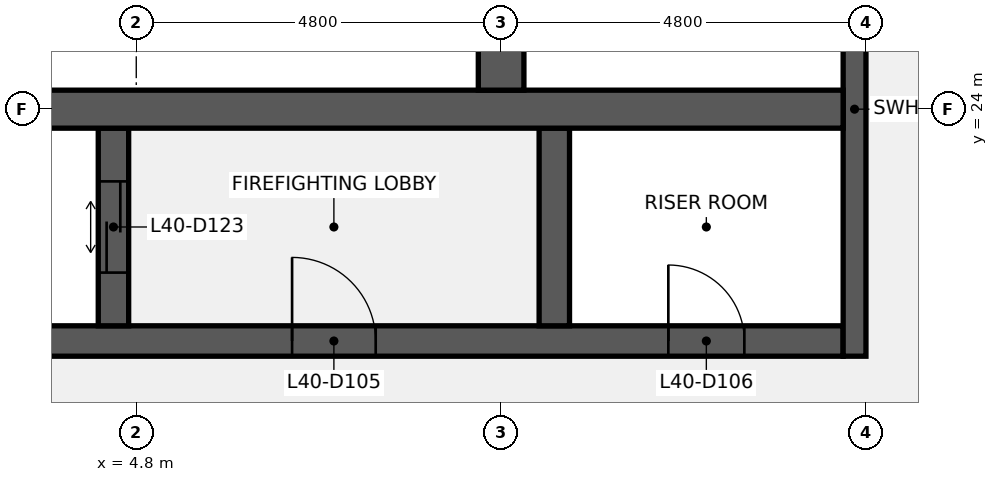
"""IFC4 building model, lengths in metres.
Left out: names, types, materials, properties, quantities, classifications, styles, units other than length and angle.
Written with IfcOpenShell. Run it as: python <this file> out.ifc"""

import sys

from ifc_helpers import new_model, si_unit, direction, frame, frame_2d, origin, place, context, subcontext, project, spatial, rectangle, extrude, element, fill, save


model = new_model("IFC4")
c1 = context("Model", 3, precision=1e-05, world=origin(), true_north=direction((0.0, 1.0)))
c2 = subcontext(c1, "Body", "Model", "MODEL_VIEW")
j1 = project(units=[si_unit("LENGTHUNIT", "METRE"), si_unit("PLANEANGLEUNIT", "RADIAN")], contexts=[c1])
p1 = place(None, origin())
s1 = spatial("IfcSite", under=j1, at=p1, CompositionType="ELEMENT")
p2 = place(p1, origin())
s2 = spatial("IfcBuilding", under=s1, at=p2, CompositionType="ELEMENT")
p3 = place(p2, frame((0.0, 0.0, 180.6)))
s3 = spatial("IfcBuildingStorey", under=s2, at=p3, CompositionType="ELEMENT", Elevation=180.6)
p4 = place(p3, frame((1.0, 20.95, 0.0), z_axis=(0.0, 0.0, 1.0), x_axis=(1.0, 0.0, 0.0)))
e1 = element("IfcWall", 1, at=p4, inside=s3, PredefinedType="SHEAR", context=c2, shape_type="SweptSolid", body=[
    extrude(rectangle(XDim=13.1, YDim=0.4, at=frame_2d((6.55, 0.0))), origin(), (0.0, 0.0, 1.0), 12.3),
])
p5 = place(p4, frame((5.85, 0.0, 0.0)))
e2 = element("IfcOpeningElement", 2, at=p5, cuts=e1, PredefinedType="OPENING", context=c2, shape_type="SweptSolid", body=[
    extrude(rectangle(XDim=1.1, YDim=2.1, at=frame_2d((0.55, 1.05))), frame((0.0, 0.21, 0.0), z_axis=(0.0, -1.0, 0.0), x_axis=(1.0, 0.0, 0.0)), (0.0, 0.0, 1.0), 0.42),
])
p6 = place(p4, frame((10.8, 0.0, 0.0)))
e3 = element("IfcOpeningElement", 3, at=p6, cuts=e1, PredefinedType="OPENING", context=c2, shape_type="SweptSolid", body=[
    extrude(rectangle(XDim=1.0, YDim=2.1, at=frame_2d((0.5, 1.05))), frame((0.0, 0.21, 0.0), z_axis=(0.0, -1.0, 0.0), x_axis=(1.0, 0.0, 0.0)), (0.0, 0.0, 1.0), 0.42),
])
p7 = place(p3, frame((14.25, 20.75, 0.0), z_axis=(0.0, 0.0, 1.0), x_axis=(0.0, 1.0, 0.0)))
e4 = element("IfcWall", 4, at=p7, inside=s3, PredefinedType="SHEAR", context=c2, shape_type="SweptSolid", body=[
    extrude(rectangle(XDim=6.5, YDim=0.3, at=frame_2d((3.25, 0.0))), origin(), (0.0, 0.0, 1.0), 12.3),
])
p8 = place(p3, frame((4.5, 21.15, 0.0), z_axis=(0.0, 0.0, 1.0), x_axis=(0.0, 1.0, 0.0)))
e5 = element("IfcWall", 5, at=p8, inside=s3, PredefinedType="SHEAR", context=c2, shape_type="SweptSolid", body=[
    extrude(rectangle(XDim=2.6, YDim=0.4, at=frame_2d((1.3, 0.0))), origin(), (0.0, 0.0, 1.0), 12.3),
])
p9 = place(p8, frame((0.7, 0.0, 0.0)))
e6 = element("IfcOpeningElement", 6, at=p9, cuts=e5, PredefinedType="OPENING", context=c2, shape_type="SweptSolid", body=[
    extrude(rectangle(XDim=1.2, YDim=2.1, at=frame_2d((0.6, 1.05))), frame((0.0, 0.21, 0.0), z_axis=(0.0, -1.0, 0.0), x_axis=(1.0, 0.0, 0.0)), (0.0, 0.0, 1.0), 0.42),
])
p10 = place(p3, frame((10.3, 21.15, 0.0), z_axis=(0.0, 0.0, 1.0), x_axis=(0.0, 1.0, 0.0)))
e7 = element("IfcWall", 7, at=p10, inside=s3, PredefinedType="SHEAR", context=c2, shape_type="SweptSolid", body=[
    extrude(rectangle(XDim=2.6, YDim=0.4, at=frame_2d((1.3, 0.0))), origin(), (0.0, 0.0, 1.0), 12.3),
])
p11 = place(p3, frame((1.0, 24.0, 0.0), z_axis=(0.0, 0.0, 1.0), x_axis=(1.0, 0.0, 0.0)))
e8 = element("IfcWall", 8, at=p11, inside=s3, PredefinedType="SHEAR", context=c2, shape_type="SweptSolid", body=[
    extrude(rectangle(XDim=13.1, YDim=0.5, at=frame_2d((6.55, 0.0))), origin(), (0.0, 0.0, 1.0), 12.3),
])
p12 = place(p3, frame((9.6, 24.25, 0.0), z_axis=(0.0, 0.0, 1.0), x_axis=(0.0, 1.0, 0.0)))
e9 = element("IfcWall", 9, at=p12, inside=s3, PredefinedType="SHEAR", context=c2, shape_type="SweptSolid", body=[
    extrude(rectangle(XDim=2.6, YDim=0.6, at=frame_2d((1.3, 0.0))), origin(), (0.0, 0.0, 1.0), 12.3),
])
p13 = place(p5, origin())
e10 = element("IfcDoor", 10, at=p13, inside=s3, OperationType="SINGLE_SWING_LEFT", PredefinedType="DOOR", context=c2, shape_type="SweptSolid", body=[
    extrude(rectangle(XDim=1.1, YDim=2.1, at=frame_2d((0.55, 1.05))), frame((0.0, 0.025, 0.0), z_axis=(0.0, -1.0, 0.0), x_axis=(1.0, 0.0, 0.0)), (0.0, 0.0, 1.0), 0.05),
])
fill(e2, e10)
p14 = place(p6, origin())
e11 = element("IfcDoor", 11, at=p14, inside=s3, OperationType="SINGLE_SWING_LEFT", PredefinedType="DOOR", context=c2, shape_type="SweptSolid", body=[
    extrude(rectangle(XDim=1.0, YDim=2.1, at=frame_2d((0.5, 1.05))), frame((0.0, 0.025, 0.0), z_axis=(0.0, -1.0, 0.0), x_axis=(1.0, 0.0, 0.0)), (0.0, 0.0, 1.0), 0.05),
])
fill(e3, e11)
p15 = place(p9, origin())
e12 = element("IfcDoor", 12, at=p15, inside=s3, OperationType="DOUBLE_DOOR_SLIDING", PredefinedType="DOOR", context=c2, shape_type="SweptSolid", body=[
    extrude(rectangle(XDim=1.2, YDim=2.1, at=frame_2d((0.6, 1.05))), frame((0.0, 0.025, 0.0), z_axis=(0.0, -1.0, 0.0), x_axis=(1.0, 0.0, 0.0)), (0.0, 0.0, 1.0), 0.05),
])
fill(e6, e12)
save(model, sys.argv[1])
